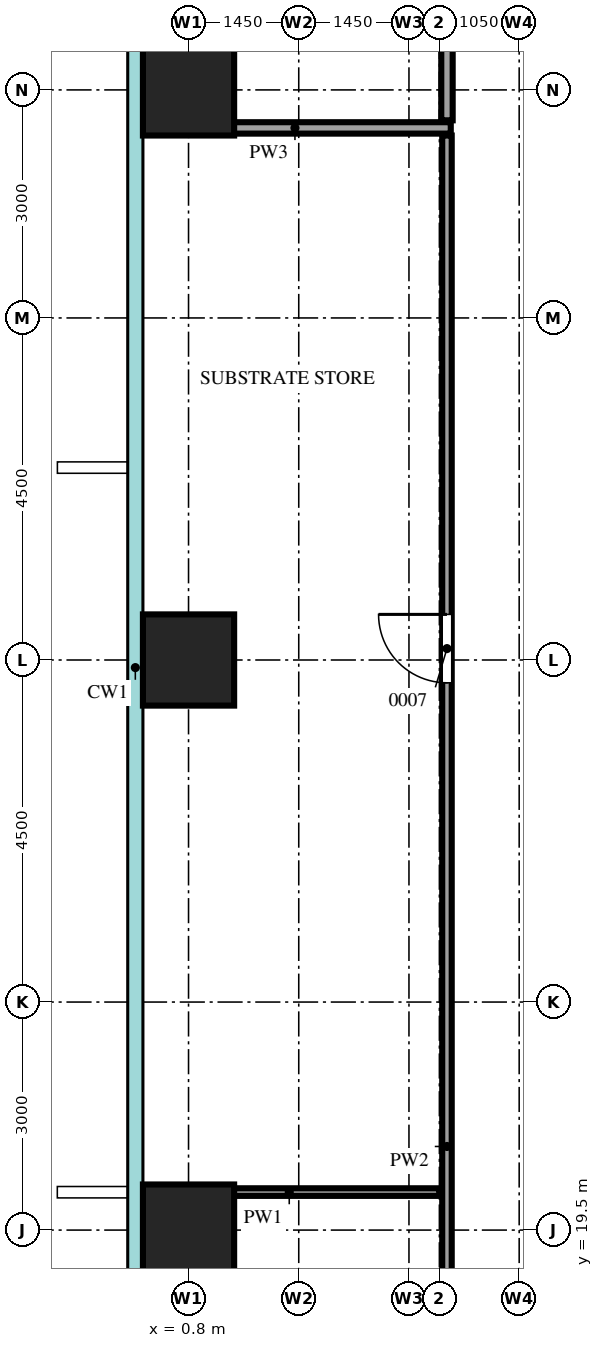
"""IFC4 building model, lengths in metres.
Left out: names, types, materials, properties, quantities, classifications, styles, units other than length and angle.
Written with IfcOpenShell. Run it as: python <this file> out.ifc"""

import sys

from ifc_helpers import new_model, si_unit, direction, frame, frame_2d, origin, origin_2d, place, context, subcontext, project, spatial, rectangle, extrude, source, transform, mapped, element, fill, save


model = new_model("IFC4")
c1 = context("Model", 3, precision=1e-05, world=origin(), true_north=direction((0.0, 1.0)))
c2 = subcontext(c1, "Body", "Model", "MODEL_VIEW")
j1 = project(units=[si_unit("LENGTHUNIT", "METRE"), si_unit("PLANEANGLEUNIT", "RADIAN")], contexts=[c1])
p1 = place(None, origin())
s1 = spatial("IfcSite", under=j1, at=p1, CompositionType="ELEMENT")
p2 = place(p1, origin())
s2 = spatial("IfcBuilding", under=s1, at=p2, CompositionType="ELEMENT")
p3 = place(p2, frame((0.0, 0.0, 33.0)))
s3 = spatial("IfcBuildingStorey", under=s2, at=p3, CompositionType="ELEMENT", Elevation=33.0)
m1 = source(origin(), c2, "Body", "SweptSolid", [
    extrude(rectangle(XDim=1.2, YDim=1.2, at=origin_2d()), origin(), (0.0, 0.0, 1.0), 4.2),
])
for number, where, z_axis, x_axis in (
    (1, (0.8, 19.5, 0.0), (0.0, 0.0, 1.0), (1.0, 0.0, 0.0)),
    (2, (0.8, 27.0, 0.0), (0.0, 0.0, 1.0), (1.0, 0.0, 0.0)),
    (3, (0.8, 34.5, 0.0), (0.0, 0.0, 1.0), (1.0, 0.0, 0.0)),
):
    element("IfcColumn", number, at=place(p3, frame(where, z_axis=z_axis, x_axis=x_axis)), inside=s3, PredefinedType="COLUMN", context=c2, shape_type="MappedRepresentation", body=[
        mapped(m1, transform((0.0, 0.0, 0.0))),
    ])
m2 = source(origin(), c2, "Body", "SweptSolid", [
    extrude(rectangle(XDim=27.75, YDim=0.125, at=frame_2d((13.875, 0.0))), origin(), (0.0, 0.0, 1.0), 4.3),
])
p4 = place(p3, frame((4.2, 6.15, 0.0), z_axis=(0.0, 0.0, 1.0), x_axis=(0.0, 1.0, 0.0)))
e4 = element("IfcWall", 4, at=p4, inside=s3, PredefinedType="PARTITIONING", context=c2, shape_type="MappedRepresentation", body=[
    mapped(m2, transform((0.0, 0.0, 0.0))),
])
m3 = source(origin(), c2, "Body", "SweptSolid", [
    extrude(rectangle(XDim=0.9, YDim=2.1, at=frame_2d((0.45, 1.05))), frame((0.0, 0.073, 0.0), z_axis=(0.0, -1.0, 0.0), x_axis=(1.0, 0.0, 0.0)), (0.0, 0.0, 1.0), 0.145),
])
p5 = place(p4, frame((0.6, 0.0, 0.0)))
e5 = element("IfcOpeningElement", 5, at=p5, cuts=e4, PredefinedType="OPENING", context=c2, shape_type="MappedRepresentation", body=[
    mapped(m3, transform((0.0, 0.0, 0.0))),
])
p6 = place(p4, frame((7.45, 0.0, 0.0)))
e6 = element("IfcOpeningElement", 6, at=p6, cuts=e4, PredefinedType="OPENING", context=c2, shape_type="MappedRepresentation", body=[
    mapped(m3, transform((0.0, 0.0, 0.0))),
])
p7 = place(p4, frame((20.55, 0.0, 0.0)))
e7 = element("IfcOpeningElement", 7, at=p7, cuts=e4, PredefinedType="OPENING", context=c2, shape_type="MappedRepresentation", body=[
    mapped(m3, transform((0.0, 0.0, 0.0))),
])
m4 = source(origin(), c2, "Body", "SweptSolid", [
    extrude(rectangle(XDim=3.95, YDim=0.1, at=frame_2d((1.975, 0.0))), origin(), (0.0, 0.0, 1.0), 4.3),
])
p8 = place(p3, frame((0.15, 20.0, 0.0), z_axis=(0.0, 0.0, 1.0), x_axis=(1.0, 0.0, 0.0)))
e8 = element("IfcWall", 8, at=p8, inside=s3, PredefinedType="PARTITIONING", context=c2, shape_type="MappedRepresentation", body=[
    mapped(m4, transform((0.0, 0.0, 0.0))),
])
m5 = source(origin(), c2, "Body", "SweptSolid", [
    extrude(rectangle(XDim=4.1, YDim=0.15, at=frame_2d((2.05, 0.0))), origin(), (0.0, 0.0, 1.0), 4.3),
])
p9 = place(p3, frame((0.15, 34.0, 0.0), z_axis=(0.0, 0.0, 1.0), x_axis=(1.0, 0.0, 0.0)))
e9 = element("IfcWall", 9, at=p9, inside=s3, PredefinedType="PARTITIONING", context=c2, shape_type="MappedRepresentation", body=[
    mapped(m5, transform((0.0, 0.0, 0.0))),
])
m6 = source(origin(), c2, "Body", "SweptSolid", [
    extrude(rectangle(XDim=19.75, YDim=0.15, at=frame_2d((9.875, 0.0))), origin(), (0.0, 0.0, 1.0), 3.6),
])
p10 = place(p3, frame((4.2, 34.1, 0.0), z_axis=(0.0, 0.0, 1.0), x_axis=(0.0, 1.0, 0.0)))
e10 = element("IfcWall", 10, at=p10, inside=s3, PredefinedType="PARTITIONING", context=c2, shape_type="MappedRepresentation", body=[
    mapped(m6, transform((0.0, 0.0, 0.0))),
])
m7 = source(origin(), c2, "Body", "SweptSolid", [
    extrude(rectangle(XDim=0.9, YDim=2.1, at=frame_2d((0.45, 1.05))), frame((0.0, 0.085, 0.0), z_axis=(0.0, -1.0, 0.0), x_axis=(1.0, 0.0, 0.0)), (0.0, 0.0, 1.0), 0.17),
])
p11 = place(p10, frame((5.4, 0.0, 0.0)))
e11 = element("IfcOpeningElement", 11, at=p11, cuts=e10, PredefinedType="OPENING", context=c2, shape_type="MappedRepresentation", body=[
    mapped(m7, transform((0.0, 0.0, 0.0))),
])
m8 = source(origin(), c2, "Body", "SweptSolid", [
    extrude(rectangle(XDim=0.9, YDim=2.1, at=frame_2d((0.45, 1.05))), frame((0.0, 0.025, 0.0), z_axis=(0.0, -1.0, 0.0), x_axis=(1.0, 0.0, 0.0)), (0.0, 0.0, 1.0), 0.05),
])
p12 = place(p7, origin())
e12 = element("IfcDoor", 12, at=p12, inside=s3, OperationType="SINGLE_SWING_LEFT", PredefinedType="DOOR", context=c2, shape_type="MappedRepresentation", body=[
    mapped(m8, transform((0.0, 0.0, 0.0))),
])
fill(e7, e12)
save(model, sys.argv[1])
